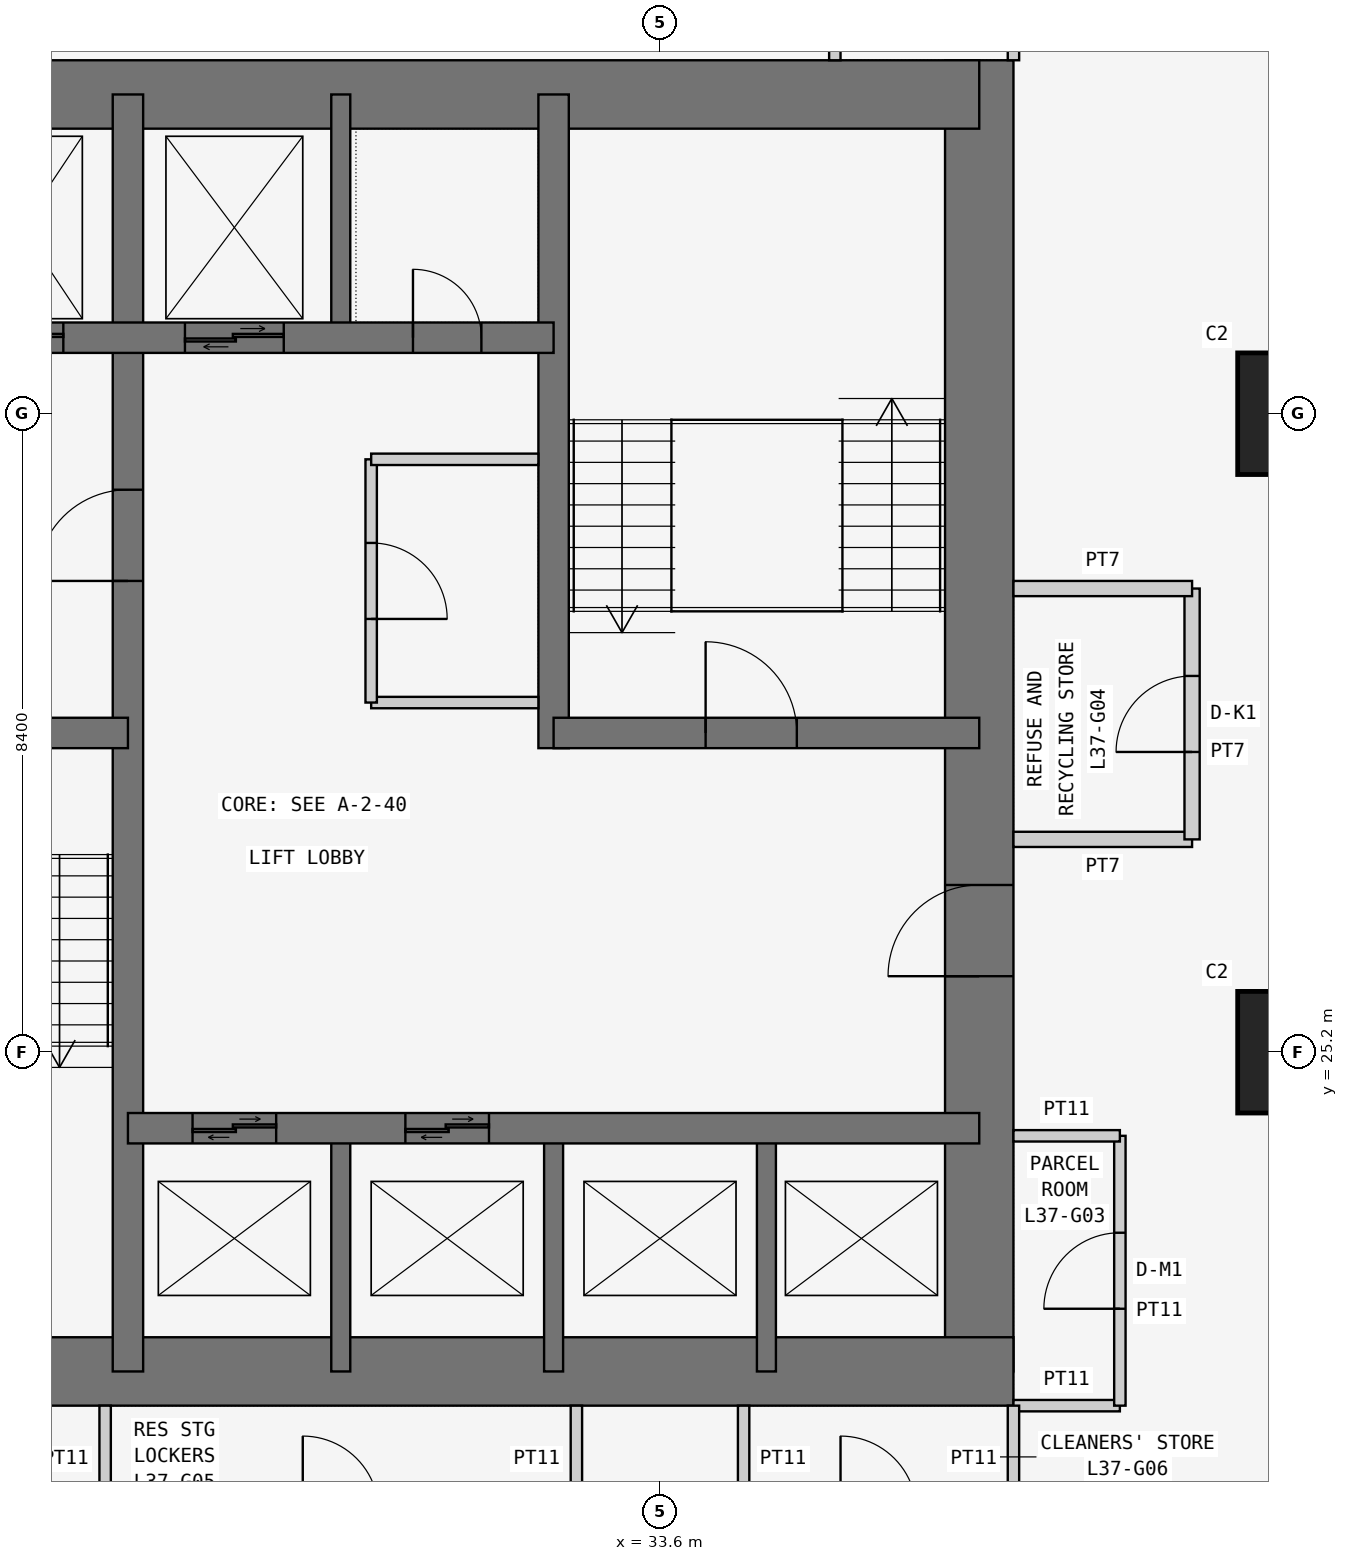
"""IFC4 building model, lengths in metres.
Left out: names, types, materials, properties, quantities, classifications, styles, units other than length and angle.
Written with IfcOpenShell. Run it as: python <this file> out.ifc"""

import sys

from ifc_helpers import new_model, si_unit, direction, frame, frame_2d, origin, origin_2d, place, context, subcontext, project, spatial, rectangle, extrude, element, fill, save


model = new_model("IFC4")
c1 = context("Model", 3, precision=1e-05, world=origin(), true_north=direction((0.0, 1.0)))
c2 = subcontext(c1, "Body", "Model", "MODEL_VIEW")
j1 = project(units=[si_unit("LENGTHUNIT", "METRE"), si_unit("PLANEANGLEUNIT", "RADIAN")], contexts=[c1])
p1 = place(None, origin())
s1 = spatial("IfcSite", under=j1, at=p1, CompositionType="ELEMENT")
p2 = place(p1, origin())
s2 = spatial("IfcBuilding", under=s1, at=p2, CompositionType="ELEMENT")
p3 = place(p2, frame((0.0, 0.0, 144.9)))
s3 = spatial("IfcBuildingStorey", under=s2, at=p3, CompositionType="ELEMENT", Elevation=144.9)
for number, where, z_axis, x_axis in (
    (1, (42.0, 25.2, 0.0), (0.0, 0.0, 1.0), (1.0, 0.0, 0.0)),
    (2, (42.0, 33.6, 0.0), (0.0, 0.0, 1.0), (1.0, 0.0, 0.0)),
):
    element("IfcColumn", number, at=place(p3, frame(where, z_axis=z_axis, x_axis=x_axis)), inside=s3, PredefinedType="COLUMN", context=c2, shape_type="SweptSolid", body=[
        extrude(rectangle(XDim=1.6, YDim=1.6, at=origin_2d()), origin(), (0.0, 0.0, 1.0), 3.6),
    ])
p4 = place(p3, frame((21.0, 21.0, 0.0), z_axis=(0.0, 0.0, 1.0), x_axis=(1.0, 0.0, 0.0)))
e3 = element("IfcWall", 3, at=p4, inside=s3, PredefinedType="SHEAR", context=c2, shape_type="SweptSolid", body=[
    extrude(rectangle(XDim=17.25, YDim=0.9, at=frame_2d((8.625, 0.0))), origin(), (0.0, 0.0, 1.0), 3.6),
])
p5 = place(p3, frame((37.8, 21.0, 0.0), z_axis=(0.0, 0.0, 1.0), x_axis=(0.0, 1.0, 0.0)))
e4 = element("IfcWall", 4, at=p5, inside=s3, PredefinedType="SHEAR", context=c2, shape_type="SweptSolid", body=[
    extrude(rectangle(XDim=17.25, YDim=0.9, at=frame_2d((8.625, 0.0))), origin(), (0.0, 0.0, 1.0), 3.6),
])
p6 = place(p5, frame((5.2, 0.0, 0.0)))
e5 = element("IfcOpeningElement", 5, at=p6, cuts=e4, PredefinedType="OPENING", context=c2, shape_type="SweptSolid", body=[
    extrude(rectangle(XDim=1.2, YDim=2.1, at=frame_2d((0.6, 1.05))), frame((0.0, 0.46, 0.0), z_axis=(0.0, -1.0, 0.0), x_axis=(1.0, 0.0, 0.0)), (0.0, 0.0, 1.0), 0.92),
])
p7 = place(p3, frame((37.8, 37.8, 0.0), z_axis=(0.0, 0.0, 1.0), x_axis=(-1.0, 0.0, 0.0)))
e6 = element("IfcWall", 6, at=p7, inside=s3, PredefinedType="SHEAR", context=c2, shape_type="SweptSolid", body=[
    extrude(rectangle(XDim=17.25, YDim=0.9, at=frame_2d((8.625, 0.0))), origin(), (0.0, 0.0, 1.0), 3.6),
])
p8 = place(p3, frame((26.6, 21.0, 0.0), z_axis=(0.0, 0.0, 1.0), x_axis=(0.0, 1.0, 0.0)))
e7 = element("IfcWall", 7, at=p8, inside=s3, PredefinedType="SHEAR", context=c2, shape_type="SweptSolid", body=[
    extrude(rectangle(XDim=16.8, YDim=0.4, at=frame_2d((8.4, 0.0))), origin(), (0.0, 0.0, 1.0), 3.6),
])
p9 = place(p8, frame((10.4, 0.0, 0.0)))
e8 = element("IfcOpeningElement", 8, at=p9, cuts=e7, PredefinedType="OPENING", context=c2, shape_type="SweptSolid", body=[
    extrude(rectangle(XDim=1.2, YDim=2.1, at=frame_2d((0.6, 1.05))), frame((0.0, 0.21, 0.0), z_axis=(0.0, -1.0, 0.0), x_axis=(1.0, 0.0, 0.0)), (0.0, 0.0, 1.0), 0.42),
])
p10 = place(p3, frame((21.0, 29.4, 0.0), z_axis=(0.0, 0.0, 1.0), x_axis=(1.0, 0.0, 0.0)))
e9 = element("IfcWall", 9, at=p10, inside=s3, PredefinedType="SHEAR", context=c2, shape_type="SweptSolid", body=[
    extrude(rectangle(XDim=5.6, YDim=0.4, at=frame_2d((2.8, 0.0))), origin(), (0.0, 0.0, 1.0), 3.6),
])
p11 = place(p10, frame((2.3, 0.0, 0.0)))
e10 = element("IfcOpeningElement", 10, at=p11, cuts=e9, PredefinedType="OPENING", context=c2, shape_type="SweptSolid", body=[
    extrude(rectangle(XDim=1.2, YDim=2.1, at=frame_2d((0.6, 1.05))), frame((0.0, 0.21, 0.0), z_axis=(0.0, -1.0, 0.0), x_axis=(1.0, 0.0, 0.0)), (0.0, 0.0, 1.0), 0.42),
])
p12 = place(p3, frame((21.0, 34.6, 0.0), z_axis=(0.0, 0.0, 1.0), x_axis=(1.0, 0.0, 0.0)))
e11 = element("IfcWall", 11, at=p12, inside=s3, PredefinedType="SHEAR", context=c2, shape_type="SweptSolid", body=[
    extrude(rectangle(XDim=11.2, YDim=0.4, at=frame_2d((5.6, 0.0))), origin(), (0.0, 0.0, 1.0), 3.6),
])
p13 = place(p12, frame((9.35, 0.0, 0.0)))
e12 = element("IfcOpeningElement", 12, at=p13, cuts=e11, PredefinedType="OPENING", context=c2, shape_type="SweptSolid", body=[
    extrude(rectangle(XDim=0.9, YDim=2.1, at=frame_2d((0.45, 1.05))), frame((0.0, 0.21, 0.0), z_axis=(0.0, -1.0, 0.0), x_axis=(1.0, 0.0, 0.0)), (0.0, 0.0, 1.0), 0.42),
])
p14 = place(p12, frame((1.0, 0.0, 0.0)))
e13 = element("IfcOpeningElement", 13, at=p14, cuts=e11, PredefinedType="OPENING", context=c2, shape_type="SweptSolid", body=[
    extrude(rectangle(XDim=1.1, YDim=2.1, at=frame_2d((0.55, 1.05))), frame((0.0, 0.21, 0.0), z_axis=(0.0, -1.0, 0.0), x_axis=(1.0, 0.0, 0.0)), (0.0, 0.0, 1.0), 0.42),
])
p15 = place(p12, frame((3.65, 0.0, 0.0)))
e14 = element("IfcOpeningElement", 14, at=p15, cuts=e11, PredefinedType="OPENING", context=c2, shape_type="SweptSolid", body=[
    extrude(rectangle(XDim=1.1, YDim=2.1, at=frame_2d((0.55, 1.05))), frame((0.0, 0.21, 0.0), z_axis=(0.0, -1.0, 0.0), x_axis=(1.0, 0.0, 0.0)), (0.0, 0.0, 1.0), 0.42),
])
p16 = place(p12, frame((6.35, 0.0, 0.0)))
e15 = element("IfcOpeningElement", 15, at=p16, cuts=e11, PredefinedType="OPENING", context=c2, shape_type="SweptSolid", body=[
    extrude(rectangle(XDim=1.3, YDim=2.1, at=frame_2d((0.65, 1.05))), frame((0.0, 0.21, 0.0), z_axis=(0.0, -1.0, 0.0), x_axis=(1.0, 0.0, 0.0)), (0.0, 0.0, 1.0), 0.42),
])
p17 = place(p3, frame((26.6, 24.2, 0.0), z_axis=(0.0, 0.0, 1.0), x_axis=(1.0, 0.0, 0.0)))
e16 = element("IfcWall", 16, at=p17, inside=s3, PredefinedType="SHEAR", context=c2, shape_type="SweptSolid", body=[
    extrude(rectangle(XDim=11.2, YDim=0.4, at=frame_2d((5.6, 0.0))), origin(), (0.0, 0.0, 1.0), 3.6),
])
p18 = place(p17, frame((0.85, 0.0, 0.0)))
e17 = element("IfcOpeningElement", 17, at=p18, cuts=e16, PredefinedType="OPENING", context=c2, shape_type="SweptSolid", body=[
    extrude(rectangle(XDim=1.1, YDim=2.1, at=frame_2d((0.55, 1.05))), frame((0.0, 0.21, 0.0), z_axis=(0.0, -1.0, 0.0), x_axis=(1.0, 0.0, 0.0)), (0.0, 0.0, 1.0), 0.42),
])
p19 = place(p17, frame((3.65, 0.0, 0.0)))
e18 = element("IfcOpeningElement", 18, at=p19, cuts=e16, PredefinedType="OPENING", context=c2, shape_type="SweptSolid", body=[
    extrude(rectangle(XDim=1.1, YDim=2.1, at=frame_2d((0.55, 1.05))), frame((0.0, 0.21, 0.0), z_axis=(0.0, -1.0, 0.0), x_axis=(1.0, 0.0, 0.0)), (0.0, 0.0, 1.0), 0.42),
])
p20 = place(p3, frame((32.2, 29.2, 0.0), z_axis=(0.0, 0.0, 1.0), x_axis=(0.0, 1.0, 0.0)))
e19 = element("IfcWall", 19, at=p20, inside=s3, PredefinedType="SHEAR", context=c2, shape_type="SweptSolid", body=[
    extrude(rectangle(XDim=8.6, YDim=0.4, at=frame_2d((4.3, 0.0))), origin(), (0.0, 0.0, 1.0), 3.6),
])
p21 = place(p3, frame((32.2, 29.4, 0.0), z_axis=(0.0, 0.0, 1.0), x_axis=(1.0, 0.0, 0.0)))
e20 = element("IfcWall", 20, at=p21, inside=s3, PredefinedType="SHEAR", context=c2, shape_type="SweptSolid", body=[
    extrude(rectangle(XDim=5.6, YDim=0.4, at=frame_2d((2.8, 0.0))), origin(), (0.0, 0.0, 1.0), 3.6),
])
p22 = place(p21, frame((2.0, 0.0, 0.0)))
e21 = element("IfcOpeningElement", 21, at=p22, cuts=e20, PredefinedType="OPENING", context=c2, shape_type="SweptSolid", body=[
    extrude(rectangle(XDim=1.2, YDim=2.1, at=frame_2d((0.6, 1.05))), frame((0.0, 0.21, 0.0), z_axis=(0.0, -1.0, 0.0), x_axis=(1.0, 0.0, 0.0)), (0.0, 0.0, 1.0), 0.42),
])
for number, where, z_axis, x_axis in (
    (22, (29.4, 21.0, 0.0), (0.0, 0.0, 1.0), (0.0, 1.0, 0.0)),
    (23, (32.2, 21.0, 0.0), (0.0, 0.0, 1.0), (0.0, 1.0, 0.0)),
    (24, (35.0, 21.0, 0.0), (0.0, 0.0, 1.0), (0.0, 1.0, 0.0)),
    (25, (29.4, 34.6, 0.0), (0.0, 0.0, 1.0), (0.0, 1.0, 0.0)),
):
    element("IfcWall", number, at=place(p3, frame(where, z_axis=z_axis, x_axis=x_axis)), inside=s3, PredefinedType="SHEAR", context=c2, shape_type="SweptSolid", body=[
        extrude(rectangle(XDim=3.2, YDim=0.25, at=frame_2d((1.6, 0.0))), origin(), (0.0, 0.0, 1.0), 3.6),
    ])
for number, where, z_axis, x_axis in (
    (26, (38.25, 38.25, 0.0), (0.0, 0.0, 1.0), (0.0, 1.0, 0.0)),
    (27, (35.9, 40.6, 0.0), (0.0, 0.0, 1.0), (0.0, -1.0, 0.0)),
):
    element("IfcWall", number, at=place(p3, frame(where, z_axis=z_axis, x_axis=x_axis)), inside=s3, PredefinedType="PARTITIONING", context=c2, shape_type="SweptSolid", body=[
        extrude(rectangle(XDim=2.35, YDim=0.15, at=frame_2d((1.175, 0.0))), origin(), (0.0, 0.0, 1.0), 3.45),
    ])
p23 = place(p3, frame((38.25, 20.55, 0.0), z_axis=(0.0, 0.0, 1.0), x_axis=(1.0, 0.0, 0.0)))
e28 = element("IfcWall", 28, at=p23, inside=s3, PredefinedType="PARTITIONING", context=c2, shape_type="SweptSolid", body=[
    extrude(rectangle(XDim=1.4, YDim=0.15, at=frame_2d((0.7, 0.0))), origin(), (0.0, 0.0, 1.0), 3.45),
])
p24 = place(p3, frame((39.65, 20.55, 0.0), z_axis=(0.0, 0.0, 1.0), x_axis=(0.0, 1.0, 0.0)))
e29 = element("IfcWall", 29, at=p24, inside=s3, PredefinedType="PARTITIONING", context=c2, shape_type="SweptSolid", body=[
    extrude(rectangle(XDim=3.55, YDim=0.15, at=frame_2d((1.775, 0.0))), origin(), (0.0, 0.0, 1.0), 3.45),
])
p25 = place(p24, frame((1.275, 0.0, 0.0)))
e30 = element("IfcOpeningElement", 30, at=p25, cuts=e29, PredefinedType="OPENING", context=c2, shape_type="SweptSolid", body=[
    extrude(rectangle(XDim=1.0, YDim=2.1, at=frame_2d((0.5, 1.05))), frame((0.0, 0.085, 0.0), z_axis=(0.0, -1.0, 0.0), x_axis=(1.0, 0.0, 0.0)), (0.0, 0.0, 1.0), 0.17),
])
p26 = place(p3, frame((39.65, 24.1, 0.0), z_axis=(0.0, 0.0, 1.0), x_axis=(-1.0, 0.0, 0.0)))
e31 = element("IfcWall", 31, at=p26, inside=s3, PredefinedType="PARTITIONING", context=c2, shape_type="SweptSolid", body=[
    extrude(rectangle(XDim=1.4, YDim=0.15, at=frame_2d((0.7, 0.0))), origin(), (0.0, 0.0, 1.0), 3.45),
])
p27 = place(p3, frame((38.25, 28.0, 0.0), z_axis=(0.0, 0.0, 1.0), x_axis=(1.0, 0.0, 0.0)))
e32 = element("IfcWall", 32, at=p27, inside=s3, PredefinedType="PARTITIONING", context=c2, shape_type="SweptSolid", body=[
    extrude(rectangle(XDim=2.35, YDim=0.2, at=frame_2d((1.175, 0.0))), origin(), (0.0, 0.0, 1.0), 3.45),
])
p28 = place(p3, frame((40.6, 28.0, 0.0), z_axis=(0.0, 0.0, 1.0), x_axis=(0.0, 1.0, 0.0)))
e33 = element("IfcWall", 33, at=p28, inside=s3, PredefinedType="PARTITIONING", context=c2, shape_type="SweptSolid", body=[
    extrude(rectangle(XDim=3.3, YDim=0.2, at=frame_2d((1.65, 0.0))), origin(), (0.0, 0.0, 1.0), 3.45),
])
p29 = place(p28, frame((1.15, 0.0, 0.0)))
e34 = element("IfcOpeningElement", 34, at=p29, cuts=e33, PredefinedType="OPENING", context=c2, shape_type="SweptSolid", body=[
    extrude(rectangle(XDim=1.0, YDim=2.1, at=frame_2d((0.5, 1.05))), frame((0.0, 0.11, 0.0), z_axis=(0.0, -1.0, 0.0), x_axis=(1.0, 0.0, 0.0)), (0.0, 0.0, 1.0), 0.22),
])
p30 = place(p3, frame((40.6, 31.3, 0.0), z_axis=(0.0, 0.0, 1.0), x_axis=(-1.0, 0.0, 0.0)))
e35 = element("IfcWall", 35, at=p30, inside=s3, PredefinedType="PARTITIONING", context=c2, shape_type="SweptSolid", body=[
    extrude(rectangle(XDim=2.35, YDim=0.2, at=frame_2d((1.175, 0.0))), origin(), (0.0, 0.0, 1.0), 3.45),
])
for number, where, z_axis, x_axis in (
    (36, (26.3, 20.55, 0.0), (0.0, 0.0, 1.0), (0.0, -1.0, 0.0)),
    (37, (32.5, 19.15, 0.0), (0.0, 0.0, 1.0), (0.0, 1.0, 0.0)),
    (38, (34.7, 20.55, 0.0), (0.0, 0.0, 1.0), (0.0, -1.0, 0.0)),
    (39, (38.25, 19.15, 0.0), (0.0, 0.0, 1.0), (0.0, 1.0, 0.0)),
):
    element("IfcWall", number, at=place(p3, frame(where, z_axis=z_axis, x_axis=x_axis)), inside=s3, PredefinedType="PARTITIONING", context=c2, shape_type="SweptSolid", body=[
        extrude(rectangle(XDim=1.4, YDim=0.15, at=frame_2d((0.7, 0.0))), origin(), (0.0, 0.0, 1.0), 3.45),
    ])
p31 = place(p3, frame((32.0, 29.8, 0.0), z_axis=(0.0, 0.0, 1.0), x_axis=(-1.0, 0.0, 0.0)))
e40 = element("IfcWall", 40, at=p31, inside=s3, PredefinedType="PARTITIONING", context=c2, shape_type="SweptSolid", body=[
    extrude(rectangle(XDim=2.2, YDim=0.15, at=frame_2d((1.1, 0.0))), origin(), (0.0, 0.0, 1.0), 3.45),
])
p32 = place(p3, frame((29.8, 29.8, 0.0), z_axis=(0.0, 0.0, 1.0), x_axis=(0.0, 1.0, 0.0)))
e41 = element("IfcWall", 41, at=p32, inside=s3, PredefinedType="PARTITIONING", context=c2, shape_type="SweptSolid", body=[
    extrude(rectangle(XDim=3.2, YDim=0.15, at=frame_2d((1.6, 0.0))), origin(), (0.0, 0.0, 1.0), 3.45),
])
p33 = place(p32, frame((1.1, 0.0, 0.0)))
e42 = element("IfcOpeningElement", 42, at=p33, cuts=e41, PredefinedType="OPENING", context=c2, shape_type="SweptSolid", body=[
    extrude(rectangle(XDim=1.0, YDim=2.1, at=frame_2d((0.5, 1.05))), frame((0.0, 0.085, 0.0), z_axis=(0.0, -1.0, 0.0), x_axis=(1.0, 0.0, 0.0)), (0.0, 0.0, 1.0), 0.17),
])
p34 = place(p3, frame((29.8, 33.0, 0.0), z_axis=(0.0, 0.0, 1.0), x_axis=(1.0, 0.0, 0.0)))
e43 = element("IfcWall", 43, at=p34, inside=s3, PredefinedType="PARTITIONING", context=c2, shape_type="SweptSolid", body=[
    extrude(rectangle(XDim=2.2, YDim=0.15, at=frame_2d((1.1, 0.0))), origin(), (0.0, 0.0, 1.0), 3.45),
])
p35 = place(p25, origin())
e44 = element("IfcDoor", 44, at=p35, inside=s3, OperationType="SINGLE_SWING_LEFT", PredefinedType="DOOR", context=c2, shape_type="SweptSolid", body=[
    extrude(rectangle(XDim=1.0, YDim=2.1, at=frame_2d((0.5, 1.05))), frame((0.0, 0.025, 0.0), z_axis=(0.0, -1.0, 0.0), x_axis=(1.0, 0.0, 0.0)), (0.0, 0.0, 1.0), 0.05),
])
fill(e30, e44)
p36 = place(p29, origin())
e45 = element("IfcDoor", 45, at=p36, inside=s3, OperationType="SINGLE_SWING_LEFT", PredefinedType="DOOR", context=c2, shape_type="SweptSolid", body=[
    extrude(rectangle(XDim=1.0, YDim=2.1, at=frame_2d((0.5, 1.05))), frame((0.0, 0.025, 0.0), z_axis=(0.0, -1.0, 0.0), x_axis=(1.0, 0.0, 0.0)), (0.0, 0.0, 1.0), 0.05),
])
fill(e34, e45)
p37 = place(p9, origin())
e46 = element("IfcDoor", 46, at=p37, inside=s3, OperationType="SINGLE_SWING_LEFT", PredefinedType="DOOR", context=c2, shape_type="SweptSolid", body=[
    extrude(rectangle(XDim=1.2, YDim=2.1, at=frame_2d((0.6, 1.05))), frame((0.0, 0.025, 0.0), z_axis=(0.0, -1.0, 0.0), x_axis=(1.0, 0.0, 0.0)), (0.0, 0.0, 1.0), 0.05),
])
fill(e8, e46)
p38 = place(p6, origin())
e47 = element("IfcDoor", 47, at=p38, inside=s3, OperationType="SINGLE_SWING_LEFT", PredefinedType="DOOR", context=c2, shape_type="SweptSolid", body=[
    extrude(rectangle(XDim=1.2, YDim=2.1, at=frame_2d((0.6, 1.05))), frame((0.0, 0.025, 0.0), z_axis=(0.0, -1.0, 0.0), x_axis=(1.0, 0.0, 0.0)), (0.0, 0.0, 1.0), 0.05),
])
fill(e5, e47)
p39 = place(p22, origin())
e48 = element("IfcDoor", 48, at=p39, inside=s3, OperationType="SINGLE_SWING_LEFT", PredefinedType="DOOR", context=c2, shape_type="SweptSolid", body=[
    extrude(rectangle(XDim=1.2, YDim=2.1, at=frame_2d((0.6, 1.05))), frame((0.0, 0.025, 0.0), z_axis=(0.0, -1.0, 0.0), x_axis=(1.0, 0.0, 0.0)), (0.0, 0.0, 1.0), 0.05),
])
fill(e21, e48)
p40 = place(p13, origin())
e49 = element("IfcDoor", 49, at=p40, inside=s3, OperationType="SINGLE_SWING_LEFT", PredefinedType="DOOR", context=c2, shape_type="SweptSolid", body=[
    extrude(rectangle(XDim=0.9, YDim=2.1, at=frame_2d((0.45, 1.05))), frame((0.0, 0.025, 0.0), z_axis=(0.0, -1.0, 0.0), x_axis=(1.0, 0.0, 0.0)), (0.0, 0.0, 1.0), 0.05),
])
fill(e12, e49)
p41 = place(p33, frame((1.0, 0.0, 0.0), z_axis=(0.0, 0.0, 1.0), x_axis=(-1.0, 0.0, 0.0)))
e50 = element("IfcDoor", 50, at=p41, inside=s3, OperationType="SINGLE_SWING_RIGHT", PredefinedType="DOOR", context=c2, shape_type="SweptSolid", body=[
    extrude(rectangle(XDim=1.0, YDim=2.1, at=frame_2d((0.5, 1.05))), frame((0.0, 0.025, 0.0), z_axis=(0.0, -1.0, 0.0), x_axis=(1.0, 0.0, 0.0)), (0.0, 0.0, 1.0), 0.05),
])
fill(e42, e50)
p42 = place(p18, origin())
e51 = element("IfcDoor", 51, at=p42, inside=s3, OperationType="DOUBLE_DOOR_SLIDING", PredefinedType="DOOR", context=c2, shape_type="SweptSolid", body=[
    extrude(rectangle(XDim=1.1, YDim=2.1, at=frame_2d((0.55, 1.05))), frame((0.0, 0.025, 0.0), z_axis=(0.0, -1.0, 0.0), x_axis=(1.0, 0.0, 0.0)), (0.0, 0.0, 1.0), 0.05),
])
fill(e17, e51)
p43 = place(p19, origin())
e52 = element("IfcDoor", 52, at=p43, inside=s3, OperationType="DOUBLE_DOOR_SLIDING", PredefinedType="DOOR", context=c2, shape_type="SweptSolid", body=[
    extrude(rectangle(XDim=1.1, YDim=2.1, at=frame_2d((0.55, 1.05))), frame((0.0, 0.025, 0.0), z_axis=(0.0, -1.0, 0.0), x_axis=(1.0, 0.0, 0.0)), (0.0, 0.0, 1.0), 0.05),
])
fill(e18, e52)
p44 = place(p15, origin())
e53 = element("IfcDoor", 53, at=p44, inside=s3, OperationType="DOUBLE_DOOR_SLIDING", PredefinedType="DOOR", context=c2, shape_type="SweptSolid", body=[
    extrude(rectangle(XDim=1.1, YDim=2.1, at=frame_2d((0.55, 1.05))), frame((0.0, 0.025, 0.0), z_axis=(0.0, -1.0, 0.0), x_axis=(1.0, 0.0, 0.0)), (0.0, 0.0, 1.0), 0.05),
])
fill(e14, e53)
p45 = place(p16, origin())
e54 = element("IfcDoor", 54, at=p45, inside=s3, OperationType="DOUBLE_DOOR_SLIDING", PredefinedType="DOOR", context=c2, shape_type="SweptSolid", body=[
    extrude(rectangle(XDim=1.3, YDim=2.1, at=frame_2d((0.65, 1.05))), frame((0.0, 0.025, 0.0), z_axis=(0.0, -1.0, 0.0), x_axis=(1.0, 0.0, 0.0)), (0.0, 0.0, 1.0), 0.05),
])
fill(e15, e54)
save(model, sys.argv[1])
